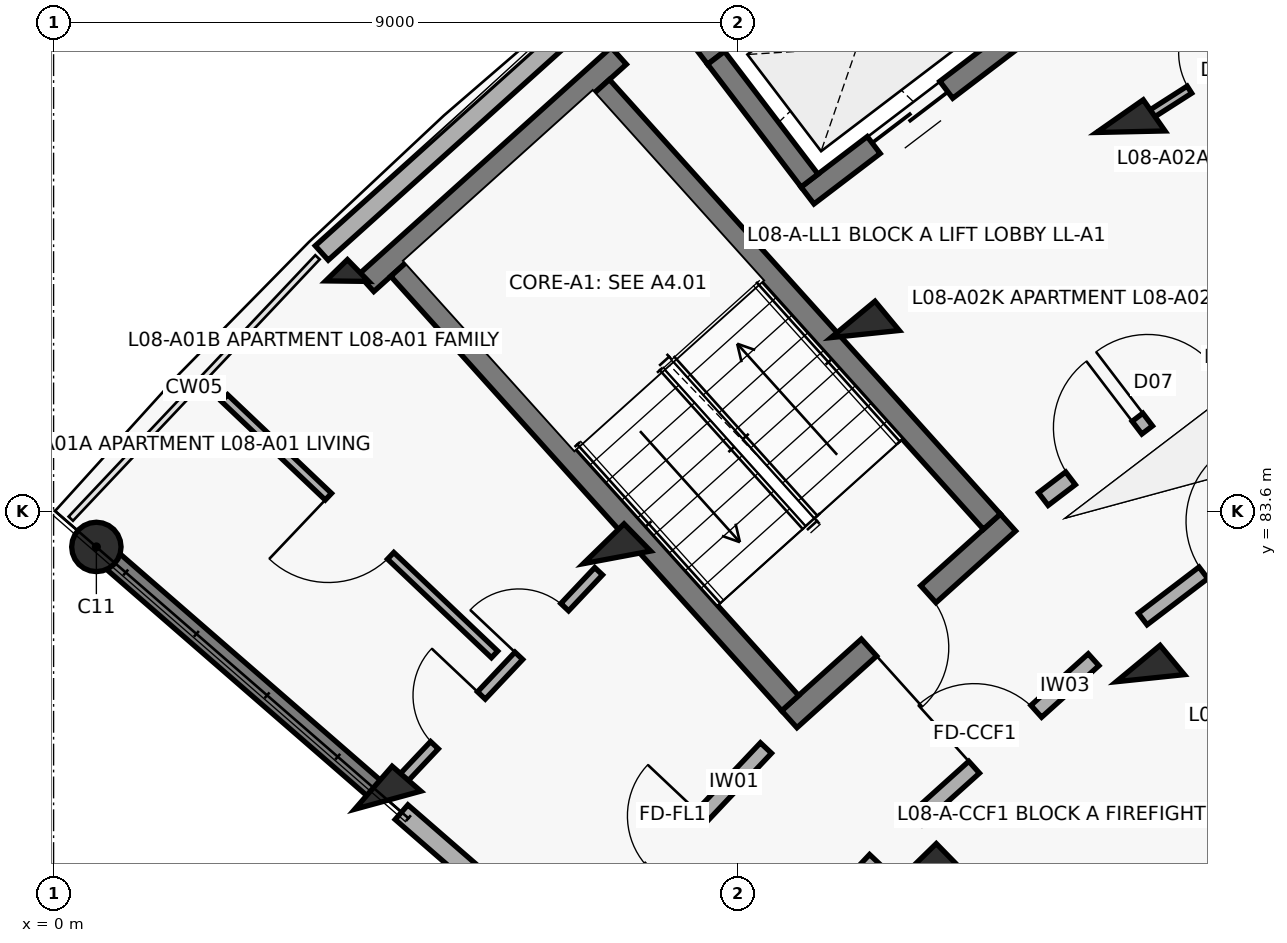
"""IFC4 building model, lengths in metres.
Left out: names, types, materials, properties, quantities, classifications, styles, units other than length and angle.
Written with IfcOpenShell. Run it as: python <this file> out.ifc"""

import sys

from ifc_helpers import new_model, si_unit, direction, frame, frame_2d, origin, origin_2d, place, context, subcontext, project, spatial, rectangle, circle, extrude, element, fill, save


model = new_model("IFC4")
c1 = context("Model", 3, precision=1e-05, world=origin(), true_north=direction((0.0, 1.0)))
c2 = subcontext(c1, "Body", "Model", "MODEL_VIEW")
j1 = project(units=[si_unit("LENGTHUNIT", "METRE"), si_unit("PLANEANGLEUNIT", "RADIAN")], contexts=[c1])
p1 = place(None, origin())
s1 = spatial("IfcSite", under=j1, at=p1, CompositionType="ELEMENT")
p2 = place(p1, origin())
s2 = spatial("IfcBuilding", under=s1, at=p2, CompositionType="ELEMENT")
p3 = place(p2, frame((0.0, 0.0, 26.7)))
s3 = spatial("IfcBuildingStorey", under=s2, at=p3, CompositionType="ELEMENT", Elevation=26.7)
p4 = place(p3, frame((4.397, 79.796, 0.0), z_axis=(0.0, 0.0, 1.0), x_axis=(-0.754709580223, 0.656059028991, 0.0)))
e1 = element("IfcColumn", 1, at=p4, inside=s3, PredefinedType="COLUMN", context=c2, shape_type="SweptSolid", body=[
    extrude(rectangle(XDim=0.5, YDim=0.75, at=origin_2d()), origin(), (0.0, 0.0, 1.0), 3.1),
])
p5 = place(p3, frame((0.563, 83.129, 0.0), z_axis=(0.0, 0.0, 1.0), x_axis=(-0.754709580223, 0.656059028991, 0.0)))
e2 = element("IfcColumn", 2, at=p5, inside=s3, PredefinedType="COLUMN", context=c2, shape_type="SweptSolid", body=[
    extrude(circle(Radius=0.325, at=origin_2d()), origin(), (0.0, 0.0, 1.0), 3.1),
])
for number, where, z_axis, x_axis in (
    (3, (11.52, 78.784, 0.0), (0.0, 0.0, 1.0), (-0.699, 0.715, 0.0)),
    (4, (7.412, 82.991, 0.0), (0.0, 0.0, 1.0), (-0.699, 0.715, 0.0)),
):
    element("IfcColumn", number, at=place(p3, frame(where, z_axis=z_axis, x_axis=x_axis)), inside=s3, PredefinedType="COLUMN", context=c2, shape_type="SweptSolid", body=[
        extrude(rectangle(XDim=0.5, YDim=0.75, at=origin_2d()), origin(), (0.0, 0.0, 1.0), 3.1),
    ])
p6 = place(p3, frame((3.863, 86.626, 0.0), z_axis=(0.0, 0.0, 1.0), x_axis=(-0.698665066769, 0.715448897181, 0.0)))
e5 = element("IfcColumn", 5, at=p6, inside=s3, PredefinedType="COLUMN", context=c2, shape_type="SweptSolid", body=[
    extrude(rectangle(XDim=0.4, YDim=0.4, at=origin_2d()), origin(), (0.0, 0.0, 1.0), 3.1),
])
for number, where, z_axis, x_axis in (
    (6, (14.429, 81.402, 0.0), (0.0, 0.0, 1.0), (-0.638, 0.77, 0.0)),
    (7, (10.678, 85.93, 0.0), (0.0, 0.0, 1.0), (-0.638, 0.77, 0.0)),
):
    element("IfcColumn", number, at=place(p3, frame(where, z_axis=z_axis, x_axis=x_axis)), inside=s3, PredefinedType="COLUMN", context=c2, shape_type="SweptSolid", body=[
        extrude(rectangle(XDim=0.5, YDim=0.75, at=origin_2d()), origin(), (0.0, 0.0, 1.0), 3.1),
    ])
p7 = place(p3, frame((7.437, 89.842, 0.0), z_axis=(0.0, 0.0, 1.0), x_axis=(-0.637961754089, 0.770068049148, 0.0)))
e8 = element("IfcColumn", 8, at=p7, inside=s3, PredefinedType="COLUMN", context=c2, shape_type="SweptSolid", body=[
    extrude(rectangle(XDim=0.45, YDim=0.65, at=origin_2d()), origin(), (0.0, 0.0, 1.0), 3.1),
])
p8 = place(p3, frame((14.172, 88.592, 0.0), z_axis=(0.0, 0.0, 1.0), x_axis=(-0.573004420611, 0.819552276527, 0.0)))
e9 = element("IfcColumn", 9, at=p8, inside=s3, PredefinedType="COLUMN", context=c2, shape_type="SweptSolid", body=[
    extrude(rectangle(XDim=0.5, YDim=0.75, at=origin_2d()), origin(), (0.0, 0.0, 1.0), 3.1),
])
p9 = place(p3, frame((4.261, 79.914, 0.0), z_axis=(0.0, 0.0, 1.0), x_axis=(-0.754703505217, 0.65606601742, 0.0)))
e10 = element("IfcWall", 10, at=p9, inside=s3, PredefinedType="SHEAR", context=c2, shape_type="SweptSolid", body=[
    extrude(rectangle(XDim=4.72, YDim=0.27, at=frame_2d((2.36, 0.0))), origin(), (0.0, 0.0, 1.0), 2.86),
])
p10 = place(p3, frame((3.528, 86.997, 0.0), z_axis=(0.0, 0.0, 1.0), x_axis=(0.743387539862, 0.668860946369, 0.0)))
e11 = element("IfcWall", 11, at=p10, inside=s3, PredefinedType="SOLIDWALL", context=c2, shape_type="SweptSolid", body=[
    extrude(rectangle(XDim=4.809, YDim=0.255, at=frame_2d((2.405, 0.0))), origin(), (0.0, 0.0, 1.0), 2.25),
])
p11 = place(p3, frame((10.766, 74.259, 0.0), z_axis=(0.0, 0.0, 1.0), x_axis=(-0.754717680958, 0.656049710044, 0.0)))
e12 = element("IfcWall", 12, at=p11, inside=s3, PredefinedType="SOLIDWALL", context=c2, shape_type="SweptSolid", body=[
    extrude(rectangle(XDim=8.2, YDim=0.255, at=frame_2d((4.1, 0.0))), origin(), (0.0, 0.0, 1.0), 2.18),
])
p12 = place(p11, frame((3.59, 0.0, 0.75)))
e13 = element("IfcOpeningElement", 13, at=p12, cuts=e12, PredefinedType="OPENING", context=c2, shape_type="SweptSolid", body=[
    extrude(rectangle(XDim=1.35, YDim=1.35, at=frame_2d((0.675, 0.675))), frame((0.0, 0.137, 0.0), z_axis=(0.0, -1.0, 0.0), x_axis=(1.0, 0.0, 0.0)), (0.0, 0.0, 1.0), 0.275),
])
p13 = place(p3, frame((12.557, 83.45, 0.0), z_axis=(0.0, 0.0, 1.0), x_axis=(-0.743375696158, -0.668874109501, 0.0)))
e14 = element("IfcWall", 14, at=p13, inside=s3, PredefinedType="SHEAR", context=c2, shape_type="SweptSolid", body=[
    extrude(rectangle(XDim=3.87, YDim=0.3, at=frame_2d((1.935, 0.0))), origin(), (0.0, 0.0, 1.0), 3.1),
])
p14 = place(p13, frame((1.41, 0.0, 0.0)))
e15 = element("IfcOpeningElement", 15, at=p14, cuts=e14, PredefinedType="OPENING", context=c2, shape_type="SweptSolid", body=[
    extrude(rectangle(XDim=1.05, YDim=2.15, at=frame_2d((0.525, 1.075))), frame((0.0, 0.16, 0.0), z_axis=(0.0, -1.0, 0.0), x_axis=(1.0, 0.0, 0.0)), (0.0, 0.0, 1.0), 0.32),
])
p15 = place(p3, frame((7.436, 89.59, 0.0), z_axis=(0.0, 0.0, 1.0), x_axis=(-0.743400052815, -0.668847038922, 0.0)))
e16 = element("IfcWall", 16, at=p15, inside=s3, PredefinedType="SHEAR", context=c2, shape_type="SweptSolid", body=[
    extrude(rectangle(XDim=4.47, YDim=0.3, at=frame_2d((2.235, 0.0))), origin(), (0.0, 0.0, 1.0), 3.1),
])
p16 = place(p3, frame((12.345, 83.461, 0.0), z_axis=(0.0, 0.0, 1.0), x_axis=(-0.668868253964, 0.743380964808, 0.0)))
e17 = element("IfcWall", 17, at=p16, inside=s3, PredefinedType="SHEAR", context=c2, shape_type="SweptSolid", body=[
    extrude(rectangle(XDim=7.69, YDim=0.3, at=frame_2d((3.845, 0.0))), origin(), (0.0, 0.0, 1.0), 3.1),
])
p17 = place(p3, frame((9.691, 81.073, 0.0), z_axis=(0.0, 0.0, 1.0), x_axis=(-0.668885797871, 0.743365179038, 0.0)))
e18 = element("IfcWall", 18, at=p17, inside=s3, PredefinedType="SHEAR", context=c2, shape_type="SweptSolid", body=[
    extrude(rectangle(XDim=7.69, YDim=0.3, at=frame_2d((3.845, 0.0))), origin(), (0.0, 0.0, 1.0), 3.1),
])
p18 = place(p3, frame((12.616, 89.807, 0.0), z_axis=(0.0, 0.0, 1.0), x_axis=(-0.795474703455, -0.605986795371, 0.0)))
e19 = element("IfcWall", 19, at=p18, inside=s3, PredefinedType="SHEAR", context=c2, shape_type="SweptSolid", body=[
    extrude(rectangle(XDim=3.39, YDim=0.28, at=frame_2d((1.695, 0.0))), origin(), (0.0, 0.0, 1.0), 3.1),
])
p19 = place(p18, frame((1.095, 0.0, 0.0)))
e20 = element("IfcOpeningElement", 20, at=p19, cuts=e19, PredefinedType="OPENING", context=c2, shape_type="SweptSolid", body=[
    extrude(rectangle(XDim=1.2, YDim=2.15, at=frame_2d((0.6, 1.075))), frame((0.0, 0.15, 0.0), z_axis=(0.0, -1.0, 0.0), x_axis=(1.0, 0.0, 0.0)), (0.0, 0.0, 1.0), 0.3),
])
p20 = place(p3, frame((11.216, 91.645, 0.0), z_axis=(0.0, 0.0, 1.0), x_axis=(-0.795439986025, -0.606032365994, 0.0)))
e21 = element("IfcWall", 21, at=p20, inside=s3, PredefinedType="SHEAR", context=c2, shape_type="SweptSolid", body=[
    extrude(rectangle(XDim=3.39, YDim=0.28, at=frame_2d((1.695, 0.0))), origin(), (0.0, 0.0, 1.0), 3.1),
])
p21 = place(p3, frame((9.946, 87.949, 0.0), z_axis=(0.0, 0.0, 1.0), x_axis=(-0.605891019062, 0.795547656033, 0.0)))
e22 = element("IfcWall", 22, at=p21, inside=s3, PredefinedType="SHEAR", context=c2, shape_type="SweptSolid", body=[
    extrude(rectangle(XDim=2.03, YDim=0.28, at=frame_2d((1.015, 0.0))), origin(), (0.0, 0.0, 1.0), 3.1),
])
p22 = place(p3, frame((7.014, 77.984, 0.0), z_axis=(0.0, 0.0, 1.0), x_axis=(0.686310507227, 0.727308660522, 0.0)))
e23 = element("IfcWall", 23, at=p22, inside=s3, PredefinedType="SOLIDWALL", context=c2, shape_type="SweptSolid", body=[
    extrude(rectangle(XDim=3.436, YDim=0.2, at=frame_2d((1.718, 0.0))), origin(), (0.0, 0.0, 1.0), 2.08),
])
p23 = place(p22, frame((1.228, 0.0, 0.0)))
e24 = element("IfcOpeningElement", 24, at=p23, cuts=e23, PredefinedType="OPENING", context=c2, shape_type="SweptSolid", body=[
    extrude(rectangle(XDim=0.98, YDim=2.15, at=frame_2d((0.49, 1.075))), frame((0.0, 0.11, 0.0), z_axis=(0.0, -1.0, 0.0), x_axis=(1.0, 0.0, 0.0)), (0.0, 0.0, 1.0), 0.22),
])
p24 = place(p3, frame((8.561, 76.639, 0.0), z_axis=(0.0, 0.0, 1.0), x_axis=(0.686307658735, 0.727311348434, 0.0)))
e25 = element("IfcWall", 25, at=p24, inside=s3, PredefinedType="SOLIDWALL", context=c2, shape_type="SweptSolid", body=[
    extrude(rectangle(XDim=3.269, YDim=0.19, at=frame_2d((1.634, 0.0))), origin(), (0.0, 0.0, 1.0), 2.08),
])
p25 = place(p24, frame((1.184, 0.0, 0.0)))
e26 = element("IfcOpeningElement", 26, at=p25, cuts=e25, PredefinedType="OPENING", context=c2, shape_type="SweptSolid", body=[
    extrude(rectangle(XDim=0.9, YDim=2.1, at=frame_2d((0.45, 1.05))), frame((0.0, 0.105, 0.0), z_axis=(0.0, -1.0, 0.0), x_axis=(1.0, 0.0, 0.0)), (0.0, 0.0, 1.0), 0.21),
])
p26 = place(p3, frame((4.565, 80.047, 0.0), z_axis=(0.0, 0.0, 1.0), x_axis=(0.686300649561, 0.727317962388, 0.0)))
e27 = element("IfcWall", 27, at=p26, inside=s3, PredefinedType="PARTITIONING", context=c2, shape_type="SweptSolid", body=[
    extrude(rectangle(XDim=3.797, YDim=0.14, at=frame_2d((1.899, 0.0))), origin(), (0.0, 0.0, 1.0), 2.08),
])
p27 = place(p26, frame((0.65, 0.0, 0.0)))
e28 = element("IfcOpeningElement", 28, at=p27, cuts=e27, PredefinedType="OPENING", context=c2, shape_type="SweptSolid", body=[
    extrude(rectangle(XDim=0.9, YDim=2.1, at=frame_2d((0.45, 1.05))), frame((0.0, 0.08, 0.0), z_axis=(0.0, -1.0, 0.0), x_axis=(1.0, 0.0, 0.0)), (0.0, 0.0, 1.0), 0.16),
])
p28 = place(p26, frame((2.267, 0.0, 0.0)))
e29 = element("IfcOpeningElement", 29, at=p28, cuts=e27, PredefinedType="OPENING", context=c2, shape_type="SweptSolid", body=[
    extrude(rectangle(XDim=0.88, YDim=2.1, at=frame_2d((0.44, 1.05))), frame((0.0, 0.08, 0.0), z_axis=(0.0, -1.0, 0.0), x_axis=(1.0, 0.0, 0.0)), (0.0, 0.0, 1.0), 0.16),
])
p29 = place(p3, frame((5.802, 81.714, 0.0), z_axis=(0.0, 0.0, 1.0), x_axis=(-0.725204659953, 0.688533369694, 0.0)))
e30 = element("IfcWall", 30, at=p29, inside=s3, PredefinedType="PARTITIONING", context=c2, shape_type="SweptSolid", body=[
    extrude(rectangle(XDim=4.9, YDim=0.12, at=frame_2d((2.45, 0.0))), origin(), (0.0, 0.0, 1.0), 2.08),
])
p30 = place(p29, frame((1.885, 0.0, 0.0)))
e31 = element("IfcOpeningElement", 31, at=p30, cuts=e30, PredefinedType="OPENING", context=c2, shape_type="SweptSolid", body=[
    extrude(rectangle(XDim=1.13, YDim=2.1, at=frame_2d((0.565, 1.05))), frame((0.0, 0.07, 0.0), z_axis=(0.0, -1.0, 0.0), x_axis=(1.0, 0.0, 0.0)), (0.0, 0.0, 1.0), 0.14),
])
p31 = place(p3, frame((11.357, 79.552, 0.0), z_axis=(0.0, 0.0, 1.0), x_axis=(0.743387266925, 0.668861249718, 0.0)))
e32 = element("IfcWall", 32, at=p31, inside=s3, PredefinedType="SOLIDWALL", context=c2, shape_type="SweptSolid", body=[
    extrude(rectangle(XDim=3.128, YDim=0.21, at=frame_2d((1.564, 0.0))), origin(), (0.0, 0.0, 1.0), 2.08),
])
p32 = place(p31, frame((1.014, 0.0, 0.0)))
e33 = element("IfcOpeningElement", 33, at=p32, cuts=e32, PredefinedType="OPENING", context=c2, shape_type="SweptSolid", body=[
    extrude(rectangle(XDim=1.1, YDim=2.15, at=frame_2d((0.55, 1.075))), frame((0.0, 0.115, 0.0), z_axis=(0.0, -1.0, 0.0), x_axis=(1.0, 0.0, 0.0)), (0.0, 0.0, 1.0), 0.23),
])
p33 = place(p3, frame((13.021, 83.759, 0.0), z_axis=(0.0, 0.0, 1.0), x_axis=(0.795498026433, 0.605956178235, 0.0)))
e34 = element("IfcWall", 34, at=p33, inside=s3, PredefinedType="SOLIDWALL", context=c2, shape_type="SweptSolid", body=[
    extrude(rectangle(XDim=3.296, YDim=0.21, at=frame_2d((1.648, 0.0))), origin(), (0.0, 0.0, 1.0), 2.08),
])
p34 = place(p33, frame((0.45, 0.0, 0.0)))
e35 = element("IfcOpeningElement", 35, at=p34, cuts=e34, PredefinedType="OPENING", context=c2, shape_type="SweptSolid", body=[
    extrude(rectangle(XDim=1.1, YDim=2.15, at=frame_2d((0.55, 1.075))), frame((0.0, 0.115, 0.0), z_axis=(0.0, -1.0, 0.0), x_axis=(1.0, 0.0, 0.0)), (0.0, 0.0, 1.0), 0.23),
])
p35 = place(p33, frame((1.726, 0.0, 0.0)))
e36 = element("IfcOpeningElement", 36, at=p35, cuts=e34, PredefinedType="OPENING", context=c2, shape_type="SweptSolid", body=[
    extrude(rectangle(XDim=1.12, YDim=2.15, at=frame_2d((0.56, 1.075))), frame((0.0, 0.115, 0.0), z_axis=(0.0, -1.0, 0.0), x_axis=(1.0, 0.0, 0.0)), (0.0, 0.0, 1.0), 0.23),
])
p36 = place(p3, frame((14.329, 82.18, 0.0), z_axis=(0.0, 0.0, 1.0), x_axis=(0.795501577908, 0.605951515838, 0.0)))
e37 = element("IfcWall", 37, at=p36, inside=s3, PredefinedType="SOLIDWALL", context=c2, shape_type="SweptSolid", body=[
    extrude(rectangle(XDim=3.129, YDim=0.19, at=frame_2d((1.564, 0.0))), origin(), (0.0, 0.0, 1.0), 2.08),
])
p37 = place(p36, frame((1.004, 0.0, 0.0)))
e38 = element("IfcOpeningElement", 38, at=p37, cuts=e37, PredefinedType="OPENING", context=c2, shape_type="SweptSolid", body=[
    extrude(rectangle(XDim=1.12, YDim=2.15, at=frame_2d((0.56, 1.075))), frame((0.0, 0.105, 0.0), z_axis=(0.0, -1.0, 0.0), x_axis=(1.0, 0.0, 0.0)), (0.0, 0.0, 1.0), 0.21),
])
p38 = place(p3, frame((14.396, 88.795, 0.0), z_axis=(0.0, 0.0, 1.0), x_axis=(0.842271400662, 0.539053696423, 0.0)))
e39 = element("IfcWall", 39, at=p38, inside=s3, PredefinedType="PARTITIONING", context=c2, shape_type="SweptSolid", body=[
    extrude(rectangle(XDim=3.797, YDim=0.11, at=frame_2d((1.898, 0.0))), origin(), (0.0, 0.0, 1.0), 2.08),
])
p39 = place(p38, frame((0.65, 0.0, 0.0)))
e40 = element("IfcOpeningElement", 40, at=p39, cuts=e39, PredefinedType="OPENING", context=c2, shape_type="SweptSolid", body=[
    extrude(rectangle(XDim=0.9, YDim=2.1, at=frame_2d((0.45, 1.05))), frame((0.0, 0.065, 0.0), z_axis=(0.0, -1.0, 0.0), x_axis=(1.0, 0.0, 0.0)), (0.0, 0.0, 1.0), 0.13),
])
p40 = place(p38, frame((2.267, 0.0, 0.0)))
e41 = element("IfcOpeningElement", 41, at=p40, cuts=e39, PredefinedType="OPENING", context=c2, shape_type="SweptSolid", body=[
    extrude(rectangle(XDim=0.88, YDim=2.1, at=frame_2d((0.44, 1.05))), frame((0.0, 0.065, 0.0), z_axis=(0.0, -1.0, 0.0), x_axis=(1.0, 0.0, 0.0)), (0.0, 0.0, 1.0), 0.13),
])
p41 = place(p14, origin())
e42 = element("IfcDoor", 42, at=p41, inside=s3, OperationType="SINGLE_SWING_RIGHT", PredefinedType="DOOR", context=c2, shape_type="SweptSolid", body=[
    extrude(rectangle(XDim=1.05, YDim=2.15, at=frame_2d((0.525, 1.075))), frame((0.0, 0.025, 0.0), z_axis=(0.0, -1.0, 0.0), x_axis=(1.0, 0.0, 0.0)), (0.0, 0.0, 1.0), 0.05),
])
fill(e15, e42)
p42 = place(p19, origin())
e43 = element("IfcDoor", 43, at=p42, inside=s3, OperationType="DOUBLE_DOOR_SLIDING", PredefinedType="DOOR", context=c2, shape_type="SweptSolid", body=[
    extrude(rectangle(XDim=1.2, YDim=2.15, at=frame_2d((0.6, 1.075))), frame((0.0, 0.025, 0.0), z_axis=(0.0, -1.0, 0.0), x_axis=(1.0, 0.0, 0.0)), (0.0, 0.0, 1.0), 0.05),
])
fill(e20, e43)
p43 = place(p23, origin())
e44 = element("IfcDoor", 44, at=p43, inside=s3, OperationType="SINGLE_SWING_RIGHT", PredefinedType="DOOR", context=c2, shape_type="SweptSolid", body=[
    extrude(rectangle(XDim=0.98, YDim=2.15, at=frame_2d((0.49, 1.075))), frame((0.0, 0.025, 0.0), z_axis=(0.0, -1.0, 0.0), x_axis=(1.0, 0.0, 0.0)), (0.0, 0.0, 1.0), 0.05),
])
fill(e24, e44)
p44 = place(p27, origin())
e45 = element("IfcDoor", 45, at=p44, inside=s3, OperationType="SINGLE_SWING_RIGHT", PredefinedType="DOOR", context=c2, shape_type="SweptSolid", body=[
    extrude(rectangle(XDim=0.9, YDim=2.1, at=frame_2d((0.45, 1.05))), frame((0.0, 0.025, 0.0), z_axis=(0.0, -1.0, 0.0), x_axis=(1.0, 0.0, 0.0)), (0.0, 0.0, 1.0), 0.05),
])
fill(e28, e45)
p45 = place(p28, origin())
e46 = element("IfcDoor", 46, at=p45, inside=s3, OperationType="SINGLE_SWING_LEFT", PredefinedType="DOOR", context=c2, shape_type="SweptSolid", body=[
    extrude(rectangle(XDim=0.88, YDim=2.1, at=frame_2d((0.44, 1.05))), frame((0.0, 0.025, 0.0), z_axis=(0.0, -1.0, 0.0), x_axis=(1.0, 0.0, 0.0)), (0.0, 0.0, 1.0), 0.05),
])
fill(e29, e46)
p46 = place(p30, origin())
e47 = element("IfcDoor", 47, at=p46, inside=s3, OperationType="SINGLE_SWING_RIGHT", PredefinedType="DOOR", context=c2, shape_type="SweptSolid", body=[
    extrude(rectangle(XDim=1.13, YDim=2.1, at=frame_2d((0.565, 1.05))), frame((0.0, 0.025, 0.0), z_axis=(0.0, -1.0, 0.0), x_axis=(1.0, 0.0, 0.0)), (0.0, 0.0, 1.0), 0.05),
])
fill(e31, e47)
p47 = place(p32, origin())
e48 = element("IfcDoor", 48, at=p47, inside=s3, OperationType="SINGLE_SWING_LEFT", PredefinedType="DOOR", context=c2, shape_type="SweptSolid", body=[
    extrude(rectangle(XDim=1.1, YDim=2.15, at=frame_2d((0.55, 1.075))), frame((0.0, 0.025, 0.0), z_axis=(0.0, -1.0, 0.0), x_axis=(1.0, 0.0, 0.0)), (0.0, 0.0, 1.0), 0.05),
])
fill(e33, e48)
p48 = place(p34, origin())
e49 = element("IfcDoor", 49, at=p48, inside=s3, OperationType="SINGLE_SWING_RIGHT", PredefinedType="DOOR", context=c2, shape_type="SweptSolid", body=[
    extrude(rectangle(XDim=1.1, YDim=2.15, at=frame_2d((0.55, 1.075))), frame((0.0, 0.025, 0.0), z_axis=(0.0, -1.0, 0.0), x_axis=(1.0, 0.0, 0.0)), (0.0, 0.0, 1.0), 0.05),
])
fill(e35, e49)
p49 = place(p35, origin())
e50 = element("IfcDoor", 50, at=p49, inside=s3, OperationType="SINGLE_SWING_LEFT", PredefinedType="DOOR", context=c2, shape_type="SweptSolid", body=[
    extrude(rectangle(XDim=1.12, YDim=2.15, at=frame_2d((0.56, 1.075))), frame((0.0, 0.025, 0.0), z_axis=(0.0, -1.0, 0.0), x_axis=(1.0, 0.0, 0.0)), (0.0, 0.0, 1.0), 0.05),
])
fill(e36, e50)
p50 = place(p37, origin())
e51 = element("IfcDoor", 51, at=p50, inside=s3, OperationType="SINGLE_SWING_RIGHT", PredefinedType="DOOR", context=c2, shape_type="SweptSolid", body=[
    extrude(rectangle(XDim=1.12, YDim=2.15, at=frame_2d((0.56, 1.075))), frame((0.0, 0.025, 0.0), z_axis=(0.0, -1.0, 0.0), x_axis=(1.0, 0.0, 0.0)), (0.0, 0.0, 1.0), 0.05),
])
fill(e38, e51)
p51 = place(p39, origin())
e52 = element("IfcDoor", 52, at=p51, inside=s3, OperationType="SINGLE_SWING_RIGHT", PredefinedType="DOOR", context=c2, shape_type="SweptSolid", body=[
    extrude(rectangle(XDim=0.9, YDim=2.1, at=frame_2d((0.45, 1.05))), frame((0.0, 0.025, 0.0), z_axis=(0.0, -1.0, 0.0), x_axis=(1.0, 0.0, 0.0)), (0.0, 0.0, 1.0), 0.05),
])
fill(e40, e52)
save(model, sys.argv[1])
